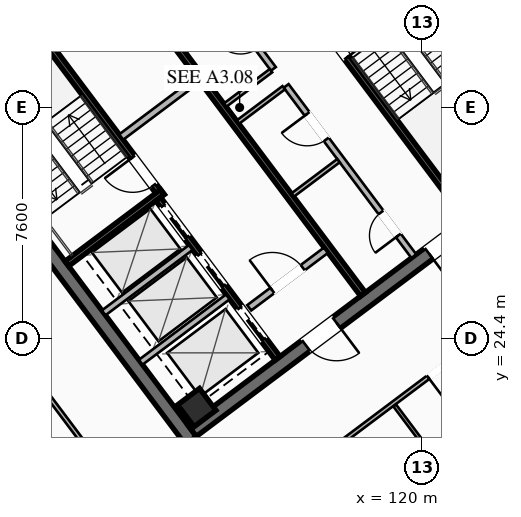
"""IFC4 building model, lengths in metres.
Left out: names, types, materials, properties, quantities, classifications, styles, units other than length and angle.
Written with IfcOpenShell. Run it as: python <this file> out.ifc"""

import sys

from ifc_helpers import new_model, si_unit, direction, frame, frame_2d, origin, origin_2d, place, context, subcontext, project, spatial, rectangle, hollow_rectangle, extrude, element, fill, save


model = new_model("IFC4")
c1 = context("Model", 3, precision=1e-05, world=origin(), true_north=direction((0.0, 1.0)))
c2 = subcontext(c1, "Body", "Model", "MODEL_VIEW")
j1 = project(units=[si_unit("LENGTHUNIT", "METRE"), si_unit("PLANEANGLEUNIT", "RADIAN")], contexts=[c1])
p1 = place(None, origin())
s1 = spatial("IfcSite", under=j1, at=p1, CompositionType="ELEMENT")
p2 = place(p1, origin())
s2 = spatial("IfcBuilding", under=s1, at=p2, CompositionType="ELEMENT")
p3 = place(p2, frame((0.0, 0.0, 236.15)))
s3 = spatial("IfcBuildingStorey", under=s2, at=p3, CompositionType="ELEMENT", Elevation=236.15)
for number, where, z_axis, x_axis in (
    (1, (112.396, 21.047, 0.0), (0.0, 0.0, 1.0), (-0.6, 0.8, 0.0)),
    (2, (115.604, 42.953, 0.0), (0.0, 0.0, 1.0), (0.6, -0.8, 0.0)),
):
    element("IfcWall", number, at=place(p3, frame(where, z_axis=z_axis, x_axis=x_axis)), inside=s3, PredefinedType="SHEAR", context=c2, shape_type="SweptSolid", body=[
        extrude(rectangle(XDim=15.6, YDim=0.45, at=frame_2d((7.8, 0.0))), origin(), (0.0, 0.0, 1.0), 3.55),
    ])
p4 = place(p3, frame((124.649, 30.518, 0.0), z_axis=(0.0, 0.0, 1.0), x_axis=(-0.8, -0.6, 0.0)))
e3 = element("IfcWall", 3, at=p4, inside=s3, PredefinedType="SHEAR", context=c2, shape_type="SweptSolid", body=[
    extrude(rectangle(XDim=15.26, YDim=0.45, at=frame_2d((7.63, 0.0))), origin(), (0.0, 0.0, 1.0), 3.55),
])
p5 = place(p4, frame((9.33, 0.0, 0.0)))
e4 = element("IfcOpeningElement", 4, at=p5, cuts=e3, PredefinedType="OPENING", context=c2, shape_type="SweptSolid", body=[
    extrude(rectangle(XDim=1.25, YDim=2.25, at=frame_2d((0.625, 1.125))), frame((0.0, 0.235, 0.0), z_axis=(0.0, -1.0, 0.0), x_axis=(1.0, 0.0, 0.0)), (0.0, 0.0, 1.0), 0.47),
])
p6 = place(p4, frame((4.28, 0.0, 0.0)))
e5 = element("IfcOpeningElement", 5, at=p6, cuts=e3, PredefinedType="OPENING", context=c2, shape_type="SweptSolid", body=[
    extrude(rectangle(XDim=1.25, YDim=2.25, at=frame_2d((0.625, 1.125))), frame((0.0, 0.235, 0.0), z_axis=(0.0, -1.0, 0.0), x_axis=(1.0, 0.0, 0.0)), (0.0, 0.0, 1.0), 0.47),
])
p7 = place(p3, frame((103.351, 33.482, 0.0), z_axis=(0.0, 0.0, 1.0), x_axis=(0.8, 0.6, 0.0)))
e6 = element("IfcWall", 6, at=p7, inside=s3, PredefinedType="SHEAR", context=c2, shape_type="SweptSolid", body=[
    extrude(rectangle(XDim=15.26, YDim=0.45, at=frame_2d((7.63, 0.0))), origin(), (0.0, 0.0, 1.0), 3.55),
])
p8 = place(p7, frame((4.68, 0.0, 0.0)))
e7 = element("IfcOpeningElement", 7, at=p8, cuts=e6, PredefinedType="OPENING", context=c2, shape_type="SweptSolid", body=[
    extrude(rectangle(XDim=1.25, YDim=2.25, at=frame_2d((0.625, 1.125))), frame((0.0, 0.235, 0.0), z_axis=(0.0, -1.0, 0.0), x_axis=(1.0, 0.0, 0.0)), (0.0, 0.0, 1.0), 0.47),
])
p9 = place(p7, frame((9.73, 0.0, 0.0)))
e8 = element("IfcOpeningElement", 8, at=p9, cuts=e6, PredefinedType="OPENING", context=c2, shape_type="SweptSolid", body=[
    extrude(rectangle(XDim=1.25, YDim=2.25, at=frame_2d((0.625, 1.125))), frame((0.0, 0.235, 0.0), z_axis=(0.0, -1.0, 0.0), x_axis=(1.0, 0.0, 0.0)), (0.0, 0.0, 1.0), 0.47),
])
p10 = place(p3, frame((112.59, 22.13, 0.0), z_axis=(0.0, 0.0, 1.0), x_axis=(0.799999996291, 0.600000004945, 0.0)))
e9 = element("IfcColumn", 9, at=p10, inside=s3, PredefinedType="COLUMN", context=c2, shape_type="SweptSolid", body=[
    extrude(hollow_rectangle(XDim=0.9, YDim=0.9, WallThickness=0.04, at=origin_2d()), origin(), (0.0, 0.0, 1.0), 3.37),
])
p11 = place(p3, frame((111.44, 29.08, 0.0), z_axis=(0.0, 0.0, 1.0), x_axis=(-0.59999041401, 0.800007189403, 0.0)))
e10 = element("IfcWall", 10, at=p11, inside=s3, PredefinedType="SHEAR", context=c2, shape_type="SweptSolid", body=[
    extrude(rectangle(XDim=8.15, YDim=0.2, at=frame_2d((4.075, 0.0))), origin(), (0.0, 0.0, 1.0), 3.37),
])
p12 = place(p11, frame((0.45, 0.0, 0.0)))
e11 = element("IfcOpeningElement", 11, at=p12, cuts=e10, PredefinedType="OPENING", context=c2, shape_type="SweptSolid", body=[
    extrude(rectangle(XDim=1.15, YDim=2.2, at=frame_2d((0.575, 1.1))), frame((0.0, 0.11, 0.0), z_axis=(0.0, -1.0, 0.0), x_axis=(1.0, 0.0, 0.0)), (0.0, 0.0, 1.0), 0.22),
])
p13 = place(p3, frame((108.316, 26.862, 0.0), z_axis=(0.0, 0.0, 1.0), x_axis=(0.800014909178, 0.599980120581, 0.0)))
e12 = element("IfcWall", 12, at=p13, inside=s3, PredefinedType="SHEAR", context=c2, shape_type="SweptSolid", body=[
    extrude(rectangle(XDim=3.93, YDim=0.2, at=frame_2d((1.965, 0.0))), origin(), (0.0, 0.0, 1.0), 3.37),
])
p14 = place(p3, frame((116.56, 34.92, 0.0), z_axis=(0.0, 0.0, 1.0), x_axis=(0.59999041401, -0.800007189403, 0.0)))
e13 = element("IfcWall", 13, at=p14, inside=s3, PredefinedType="SHEAR", context=c2, shape_type="SweptSolid", body=[
    extrude(rectangle(XDim=8.15, YDim=0.2, at=frame_2d((4.075, 0.0))), origin(), (0.0, 0.0, 1.0), 3.37),
])
p15 = place(p14, frame((0.45, 0.0, 0.0)))
e14 = element("IfcOpeningElement", 14, at=p15, cuts=e13, PredefinedType="OPENING", context=c2, shape_type="SweptSolid", body=[
    extrude(rectangle(XDim=1.15, YDim=2.2, at=frame_2d((0.575, 1.1))), frame((0.0, 0.11, 0.0), z_axis=(0.0, -1.0, 0.0), x_axis=(1.0, 0.0, 0.0)), (0.0, 0.0, 1.0), 0.22),
])
p16 = place(p3, frame((118.058, 25.856, 0.0), z_axis=(0.0, 0.0, 1.0), x_axis=(-0.600002657301, 0.799998007018, 0.0)))
e15 = element("IfcWall", 15, at=p16, inside=s3, PredefinedType="SHEAR", context=c2, shape_type="SweptSolid", body=[
    extrude(rectangle(XDim=14.7, YDim=0.2, at=frame_2d((7.35, 0.0))), origin(), (0.0, 0.0, 1.0), 3.37),
])
p17 = place(p3, frame((110.104, 31.028, 0.0), z_axis=(0.0, 0.0, 1.0), x_axis=(0.800018601094, 0.59997519774, 0.0)))
e16 = element("IfcWall", 16, at=p17, inside=s3, PredefinedType="SOLIDWALL", context=c2, shape_type="SweptSolid", body=[
    extrude(rectangle(XDim=3.15, YDim=0.22, at=frame_2d((1.575, 0.0))), origin(), (0.0, 0.0, 1.0), 2.723),
])
p18 = place(p3, frame((114.316, 25.412, 0.0), z_axis=(0.0, 0.0, 1.0), x_axis=(0.800018601094, 0.59997519774, 0.0)))
e17 = element("IfcWall", 17, at=p18, inside=s3, PredefinedType="SOLIDWALL", context=c2, shape_type="SweptSolid", body=[
    extrude(rectangle(XDim=3.15, YDim=0.22, at=frame_2d((1.575, 0.0))), origin(), (0.0, 0.0, 1.0), 2.723),
])
p19 = place(p18, frame((0.95, 0.0, 0.0)))
e18 = element("IfcOpeningElement", 18, at=p19, cuts=e17, PredefinedType="OPENING", context=c2, shape_type="SweptSolid", body=[
    extrude(rectangle(XDim=1.25, YDim=2.25, at=frame_2d((0.625, 1.125))), frame((0.0, 0.12, 0.0), z_axis=(0.0, -1.0, 0.0), x_axis=(1.0, 0.0, 0.0)), (0.0, 0.0, 1.0), 0.24),
])
p20 = place(p3, frame((115.25, 23.75, 0.0), z_axis=(0.0, 0.0, 1.0), x_axis=(-0.599994036198, 0.800004472816, 0.0)))
e19 = element("IfcWall", 19, at=p20, inside=s3, PredefinedType="SHEAR", context=c2, shape_type="SweptSolid", body=[
    extrude(rectangle(XDim=6.55, YDim=0.2, at=frame_2d((3.275, 0.0))), origin(), (0.0, 0.0, 1.0), 3.37),
])
p21 = place(p20, frame((4.975, 0.0, 0.0)))
e20 = element("IfcOpeningElement", 20, at=p21, cuts=e19, PredefinedType="OPENING", context=c2, shape_type="SweptSolid", body=[
    extrude(rectangle(XDim=1.3, YDim=2.25, at=frame_2d((0.65, 1.125))), frame((0.0, 0.11, 0.0), z_axis=(0.0, -1.0, 0.0), x_axis=(1.0, 0.0, 0.0)), (0.0, 0.0, 1.0), 0.22),
])
p22 = place(p20, frame((2.975, 0.0, 0.0)))
e21 = element("IfcOpeningElement", 21, at=p22, cuts=e19, PredefinedType="OPENING", context=c2, shape_type="SweptSolid", body=[
    extrude(rectangle(XDim=1.3, YDim=2.25, at=frame_2d((0.65, 1.125))), frame((0.0, 0.11, 0.0), z_axis=(0.0, -1.0, 0.0), x_axis=(1.0, 0.0, 0.0)), (0.0, 0.0, 1.0), 0.22),
])
p23 = place(p20, frame((0.775, 0.0, 0.0)))
e22 = element("IfcOpeningElement", 22, at=p23, cuts=e19, PredefinedType="OPENING", context=c2, shape_type="SweptSolid", body=[
    extrude(rectangle(XDim=1.3, YDim=2.25, at=frame_2d((0.65, 1.125))), frame((0.0, 0.11, 0.0), z_axis=(0.0, -1.0, 0.0), x_axis=(1.0, 0.0, 0.0)), (0.0, 0.0, 1.0), 0.22),
])
for number, where, z_axis, x_axis in (
    (23, (110.746, 23.622, 0.0), (0.0, 0.0, 1.0), (0.8, 0.6, 0.0)),
    (24, (109.528, 25.246, 0.0), (0.0, 0.0, 1.0), (0.8, 0.6, 0.0)),
):
    element("IfcWall", number, at=place(p3, frame(where, z_axis=z_axis, x_axis=x_axis)), inside=s3, PredefinedType="SOLIDWALL", context=c2, shape_type="SweptSolid", body=[
        extrude(rectangle(XDim=3.58, YDim=0.2, at=frame_2d((1.79, 0.0))), origin(), (0.0, 0.0, 1.0), 3.37),
    ])
p24 = place(p3, frame((119.73, 27.11, 0.0), z_axis=(0.0, 0.0, 1.0), x_axis=(-0.600005580459, 0.799995814625, 0.0)))
e25 = element("IfcWall", 25, at=p24, inside=s3, PredefinedType="SOLIDWALL", context=c2, shape_type="SweptSolid", body=[
    extrude(rectangle(XDim=7.0, YDim=0.2, at=frame_2d((3.5, 0.0))), origin(), (0.0, 0.0, 1.0), 2.723),
])
p25 = place(p24, frame((0.85, 0.0, 0.0)))
e26 = element("IfcOpeningElement", 26, at=p25, cuts=e25, PredefinedType="OPENING", context=c2, shape_type="SweptSolid", body=[
    extrude(rectangle(XDim=0.95, YDim=2.05, at=frame_2d((0.475, 1.025))), frame((0.0, 0.11, 0.0), z_axis=(0.0, -1.0, 0.0), x_axis=(1.0, 0.0, 0.0)), (0.0, 0.0, 1.0), 0.22),
])
p26 = place(p24, frame((4.8, 0.0, 0.0)))
e27 = element("IfcOpeningElement", 27, at=p26, cuts=e25, PredefinedType="OPENING", context=c2, shape_type="SweptSolid", body=[
    extrude(rectangle(XDim=1.05, YDim=2.2, at=frame_2d((0.525, 1.1))), frame((0.0, 0.11, 0.0), z_axis=(0.0, -1.0, 0.0), x_axis=(1.0, 0.0, 0.0)), (0.0, 0.0, 1.0), 0.22),
])
for number, where, z_axis, x_axis in (
    (28, (113.946, 31.522, 0.0), (0.0, 0.0, 1.0), (0.8, 0.6, 0.0)),
    (29, (115.746, 29.122, 0.0), (0.0, 0.0, 1.0), (0.8, 0.6, 0.0)),
):
    element("IfcWall", number, at=place(p3, frame(where, z_axis=z_axis, x_axis=x_axis)), inside=s3, PredefinedType="PARTITIONING", context=c2, shape_type="SweptSolid", body=[
        extrude(rectangle(XDim=1.88, YDim=0.135, at=frame_2d((0.94, 0.0))), origin(), (0.0, 0.0, 1.0), 2.723),
    ])
p27 = place(p3, frame((115.11, 33.27, 0.0), z_axis=(0.0, 0.0, 1.0), x_axis=(-0.600011160345, 0.79999162962, 0.0)))
e30 = element("IfcWall", 30, at=p27, inside=s3, PredefinedType="SOLIDWALL", context=c2, shape_type="SweptSolid", body=[
    extrude(rectangle(XDim=7.0, YDim=0.2, at=frame_2d((3.5, 0.0))), origin(), (0.0, 0.0, 1.0), 2.723),
])
p28 = place(p27, frame((0.85, 0.0, 0.0)))
e31 = element("IfcOpeningElement", 31, at=p28, cuts=e30, PredefinedType="OPENING", context=c2, shape_type="SweptSolid", body=[
    extrude(rectangle(XDim=0.95, YDim=2.05, at=frame_2d((0.475, 1.025))), frame((0.0, 0.11, 0.0), z_axis=(0.0, -1.0, 0.0), x_axis=(1.0, 0.0, 0.0)), (0.0, 0.0, 1.0), 0.22),
])
p29 = place(p27, frame((4.85, 0.0, 0.0)))
e32 = element("IfcOpeningElement", 32, at=p29, cuts=e30, PredefinedType="OPENING", context=c2, shape_type="SweptSolid", body=[
    extrude(rectangle(XDim=0.95, YDim=2.05, at=frame_2d((0.475, 1.025))), frame((0.0, 0.11, 0.0), z_axis=(0.0, -1.0, 0.0), x_axis=(1.0, 0.0, 0.0)), (0.0, 0.0, 1.0), 0.22),
])
p30 = place(p3, frame((113.526, 32.082, 0.0), z_axis=(0.0, 0.0, 1.0), x_axis=(0.800046745961, 0.599937666993, 0.0)))
e33 = element("IfcWall", 33, at=p30, inside=s3, PredefinedType="PARTITIONING", context=c2, shape_type="SweptSolid", body=[
    extrude(rectangle(XDim=1.88, YDim=0.135, at=frame_2d((0.94, 0.0))), origin(), (0.0, 0.0, 1.0), 2.723),
])
p31 = place(p3, frame((99.746, 33.122, 0.0), z_axis=(0.0, 0.0, 1.0), x_axis=(0.800001242445, 0.599998343403, 0.0)))
e34 = element("IfcWall", 34, at=p31, inside=s3, PredefinedType="PARTITIONING", context=c2, shape_type="SweptSolid", body=[
    extrude(rectangle(XDim=23.58, YDim=0.135, at=frame_2d((11.79, 0.0))), origin(), (0.0, 0.0, 1.0), 2.723),
])
p32 = place(p31, frame((0.3, 0.0, 0.0)))
e35 = element("IfcOpeningElement", 35, at=p32, cuts=e34, PredefinedType="OPENING", context=c2, shape_type="SweptSolid", body=[
    extrude(rectangle(XDim=0.95, YDim=2.05, at=frame_2d((0.475, 1.025))), frame((0.0, 0.077, 0.0), z_axis=(0.0, -1.0, 0.0), x_axis=(1.0, 0.0, 0.0)), (0.0, 0.0, 1.0), 0.155),
])
p33 = place(p31, frame((10.512, 0.0, 0.0)))
e36 = element("IfcOpeningElement", 36, at=p33, cuts=e34, PredefinedType="OPENING", context=c2, shape_type="SweptSolid", body=[
    extrude(rectangle(XDim=0.95, YDim=2.05, at=frame_2d((0.475, 1.025))), frame((0.0, 0.077, 0.0), z_axis=(0.0, -1.0, 0.0), x_axis=(1.0, 0.0, 0.0)), (0.0, 0.0, 1.0), 0.155),
])
p34 = place(p31, frame((22.33, 0.0, 0.0)))
e37 = element("IfcOpeningElement", 37, at=p34, cuts=e34, PredefinedType="OPENING", context=c2, shape_type="SweptSolid", body=[
    extrude(rectangle(XDim=0.95, YDim=2.05, at=frame_2d((0.475, 1.025))), frame((0.0, 0.077, 0.0), z_axis=(0.0, -1.0, 0.0), x_axis=(1.0, 0.0, 0.0)), (0.0, 0.0, 1.0), 0.155),
])
p35 = place(p3, frame((124.012, 25.984, 0.0), z_axis=(0.0, 0.0, 1.0), x_axis=(-0.800003872688, -0.599994836382, 0.0)))
e38 = element("IfcWall", 38, at=p35, inside=s3, PredefinedType="PARTITIONING", context=c2, shape_type="SweptSolid", body=[
    extrude(rectangle(XDim=15.13, YDim=0.135, at=frame_2d((7.565, 0.0))), origin(), (0.0, 0.0, 1.0), 2.723),
])
p36 = place(p35, frame((13.8, 0.0, 0.0)))
e39 = element("IfcOpeningElement", 39, at=p36, cuts=e38, PredefinedType="OPENING", context=c2, shape_type="SweptSolid", body=[
    extrude(rectangle(XDim=0.95, YDim=2.05, at=frame_2d((0.475, 1.025))), frame((0.0, 0.077, 0.0), z_axis=(0.0, -1.0, 0.0), x_axis=(1.0, 0.0, 0.0)), (0.0, 0.0, 1.0), 0.155),
])
p37 = place(p35, frame((3.813, 0.0, 0.0)))
e40 = element("IfcOpeningElement", 40, at=p37, cuts=e38, PredefinedType="OPENING", context=c2, shape_type="SweptSolid", body=[
    extrude(rectangle(XDim=0.95, YDim=2.05, at=frame_2d((0.475, 1.025))), frame((0.0, 0.077, 0.0), z_axis=(0.0, -1.0, 0.0), x_axis=(1.0, 0.0, 0.0)), (0.0, 0.0, 1.0), 0.155),
])
p38 = place(p3, frame((121.488, 19.016, 0.0), z_axis=(0.0, 0.0, 1.0), x_axis=(-0.600009815063, 0.799992638609, 0.0)))
e41 = element("IfcWall", 41, at=p38, inside=s3, PredefinedType="PARTITIONING", context=c2, shape_type="SweptSolid", body=[
    extrude(rectangle(XDim=3.98, YDim=0.11, at=frame_2d((1.99, 0.0))), origin(), (0.0, 0.0, 1.0), 2.723),
])
p39 = place(p3, frame((111.86, 16.97, 0.0), z_axis=(0.0, 0.0, 1.0), x_axis=(-0.60000194242, 0.799998543181, 0.0)))
e42 = element("IfcWall", 42, at=p39, inside=s3, PredefinedType="PARTITIONING", context=c2, shape_type="SweptSolid", body=[
    extrude(rectangle(XDim=20.11, YDim=0.135, at=frame_2d((10.055, 0.0))), origin(), (0.0, 0.0, 1.0), 2.723),
])
p40 = place(p39, frame((0.3, 0.0, 0.0)))
e43 = element("IfcOpeningElement", 43, at=p40, cuts=e42, PredefinedType="OPENING", context=c2, shape_type="SweptSolid", body=[
    extrude(rectangle(XDim=0.95, YDim=2.05, at=frame_2d((0.475, 1.025))), frame((0.0, 0.077, 0.0), z_axis=(0.0, -1.0, 0.0), x_axis=(1.0, 0.0, 0.0)), (0.0, 0.0, 1.0), 0.155),
])
p41 = place(p5, origin())
e44 = element("IfcDoor", 44, at=p41, inside=s3, OperationType="SINGLE_SWING_LEFT", PredefinedType="DOOR", context=c2, shape_type="SweptSolid", body=[
    extrude(rectangle(XDim=1.25, YDim=2.25, at=frame_2d((0.625, 1.125))), frame((0.0, 0.025, 0.0), z_axis=(0.0, -1.0, 0.0), x_axis=(1.0, 0.0, 0.0)), (0.0, 0.0, 1.0), 0.05),
])
fill(e4, e44)
p42 = place(p6, origin())
e45 = element("IfcDoor", 45, at=p42, inside=s3, OperationType="SINGLE_SWING_RIGHT", PredefinedType="DOOR", context=c2, shape_type="SweptSolid", body=[
    extrude(rectangle(XDim=1.25, YDim=2.25, at=frame_2d((0.625, 1.125))), frame((0.0, 0.025, 0.0), z_axis=(0.0, -1.0, 0.0), x_axis=(1.0, 0.0, 0.0)), (0.0, 0.0, 1.0), 0.05),
])
fill(e5, e45)
p43 = place(p12, origin())
e46 = element("IfcDoor", 46, at=p43, inside=s3, OperationType="SINGLE_SWING_RIGHT", PredefinedType="DOOR", context=c2, shape_type="SweptSolid", body=[
    extrude(rectangle(XDim=1.15, YDim=2.2, at=frame_2d((0.575, 1.1))), frame((0.0, 0.025, 0.0), z_axis=(0.0, -1.0, 0.0), x_axis=(1.0, 0.0, 0.0)), (0.0, 0.0, 1.0), 0.05),
])
fill(e11, e46)
p44 = place(p15, origin())
e47 = element("IfcDoor", 47, at=p44, inside=s3, OperationType="SINGLE_SWING_RIGHT", PredefinedType="DOOR", context=c2, shape_type="SweptSolid", body=[
    extrude(rectangle(XDim=1.15, YDim=2.2, at=frame_2d((0.575, 1.1))), frame((0.0, 0.025, 0.0), z_axis=(0.0, -1.0, 0.0), x_axis=(1.0, 0.0, 0.0)), (0.0, 0.0, 1.0), 0.05),
])
fill(e14, e47)
p45 = place(p19, origin())
e48 = element("IfcDoor", 48, at=p45, inside=s3, OperationType="SINGLE_SWING_LEFT", PredefinedType="DOOR", context=c2, shape_type="SweptSolid", body=[
    extrude(rectangle(XDim=1.25, YDim=2.25, at=frame_2d((0.625, 1.125))), frame((0.0, 0.025, 0.0), z_axis=(0.0, -1.0, 0.0), x_axis=(1.0, 0.0, 0.0)), (0.0, 0.0, 1.0), 0.05),
])
fill(e18, e48)
p46 = place(p25, origin())
e49 = element("IfcDoor", 49, at=p46, inside=s3, OperationType="SINGLE_SWING_LEFT", PredefinedType="DOOR", context=c2, shape_type="SweptSolid", body=[
    extrude(rectangle(XDim=0.95, YDim=2.05, at=frame_2d((0.475, 1.025))), frame((0.0, 0.025, 0.0), z_axis=(0.0, -1.0, 0.0), x_axis=(1.0, 0.0, 0.0)), (0.0, 0.0, 1.0), 0.05),
])
fill(e26, e49)
p47 = place(p26, origin())
e50 = element("IfcDoor", 50, at=p47, inside=s3, OperationType="SINGLE_SWING_RIGHT", PredefinedType="DOOR", context=c2, shape_type="SweptSolid", body=[
    extrude(rectangle(XDim=1.05, YDim=2.2, at=frame_2d((0.525, 1.1))), frame((0.0, 0.025, 0.0), z_axis=(0.0, -1.0, 0.0), x_axis=(1.0, 0.0, 0.0)), (0.0, 0.0, 1.0), 0.05),
])
fill(e27, e50)
p48 = place(p37, origin())
e51 = element("IfcDoor", 51, at=p48, inside=s3, OperationType="SINGLE_SWING_RIGHT", PredefinedType="DOOR", context=c2, shape_type="SweptSolid", body=[
    extrude(rectangle(XDim=0.95, YDim=2.05, at=frame_2d((0.475, 1.025))), frame((0.0, 0.025, 0.0), z_axis=(0.0, -1.0, 0.0), x_axis=(1.0, 0.0, 0.0)), (0.0, 0.0, 1.0), 0.05),
])
fill(e40, e51)
p49 = place(p21, origin())
e52 = element("IfcDoor", 52, at=p49, inside=s3, OperationType="SLIDING_TO_LEFT", PredefinedType="DOOR", context=c2, shape_type="SweptSolid", body=[
    extrude(rectangle(XDim=1.3, YDim=2.25, at=frame_2d((0.65, 1.125))), frame((0.0, 0.025, 0.0), z_axis=(0.0, -1.0, 0.0), x_axis=(1.0, 0.0, 0.0)), (0.0, 0.0, 1.0), 0.05),
])
fill(e20, e52)
p50 = place(p22, origin())
e53 = element("IfcDoor", 53, at=p50, inside=s3, OperationType="SLIDING_TO_LEFT", PredefinedType="DOOR", context=c2, shape_type="SweptSolid", body=[
    extrude(rectangle(XDim=1.3, YDim=2.25, at=frame_2d((0.65, 1.125))), frame((0.0, 0.025, 0.0), z_axis=(0.0, -1.0, 0.0), x_axis=(1.0, 0.0, 0.0)), (0.0, 0.0, 1.0), 0.05),
])
fill(e21, e53)
p51 = place(p23, origin())
e54 = element("IfcDoor", 54, at=p51, inside=s3, OperationType="SLIDING_TO_LEFT", PredefinedType="DOOR", context=c2, shape_type="SweptSolid", body=[
    extrude(rectangle(XDim=1.3, YDim=2.25, at=frame_2d((0.65, 1.125))), frame((0.0, 0.025, 0.0), z_axis=(0.0, -1.0, 0.0), x_axis=(1.0, 0.0, 0.0)), (0.0, 0.0, 1.0), 0.05),
])
fill(e22, e54)
save(model, sys.argv[1])
